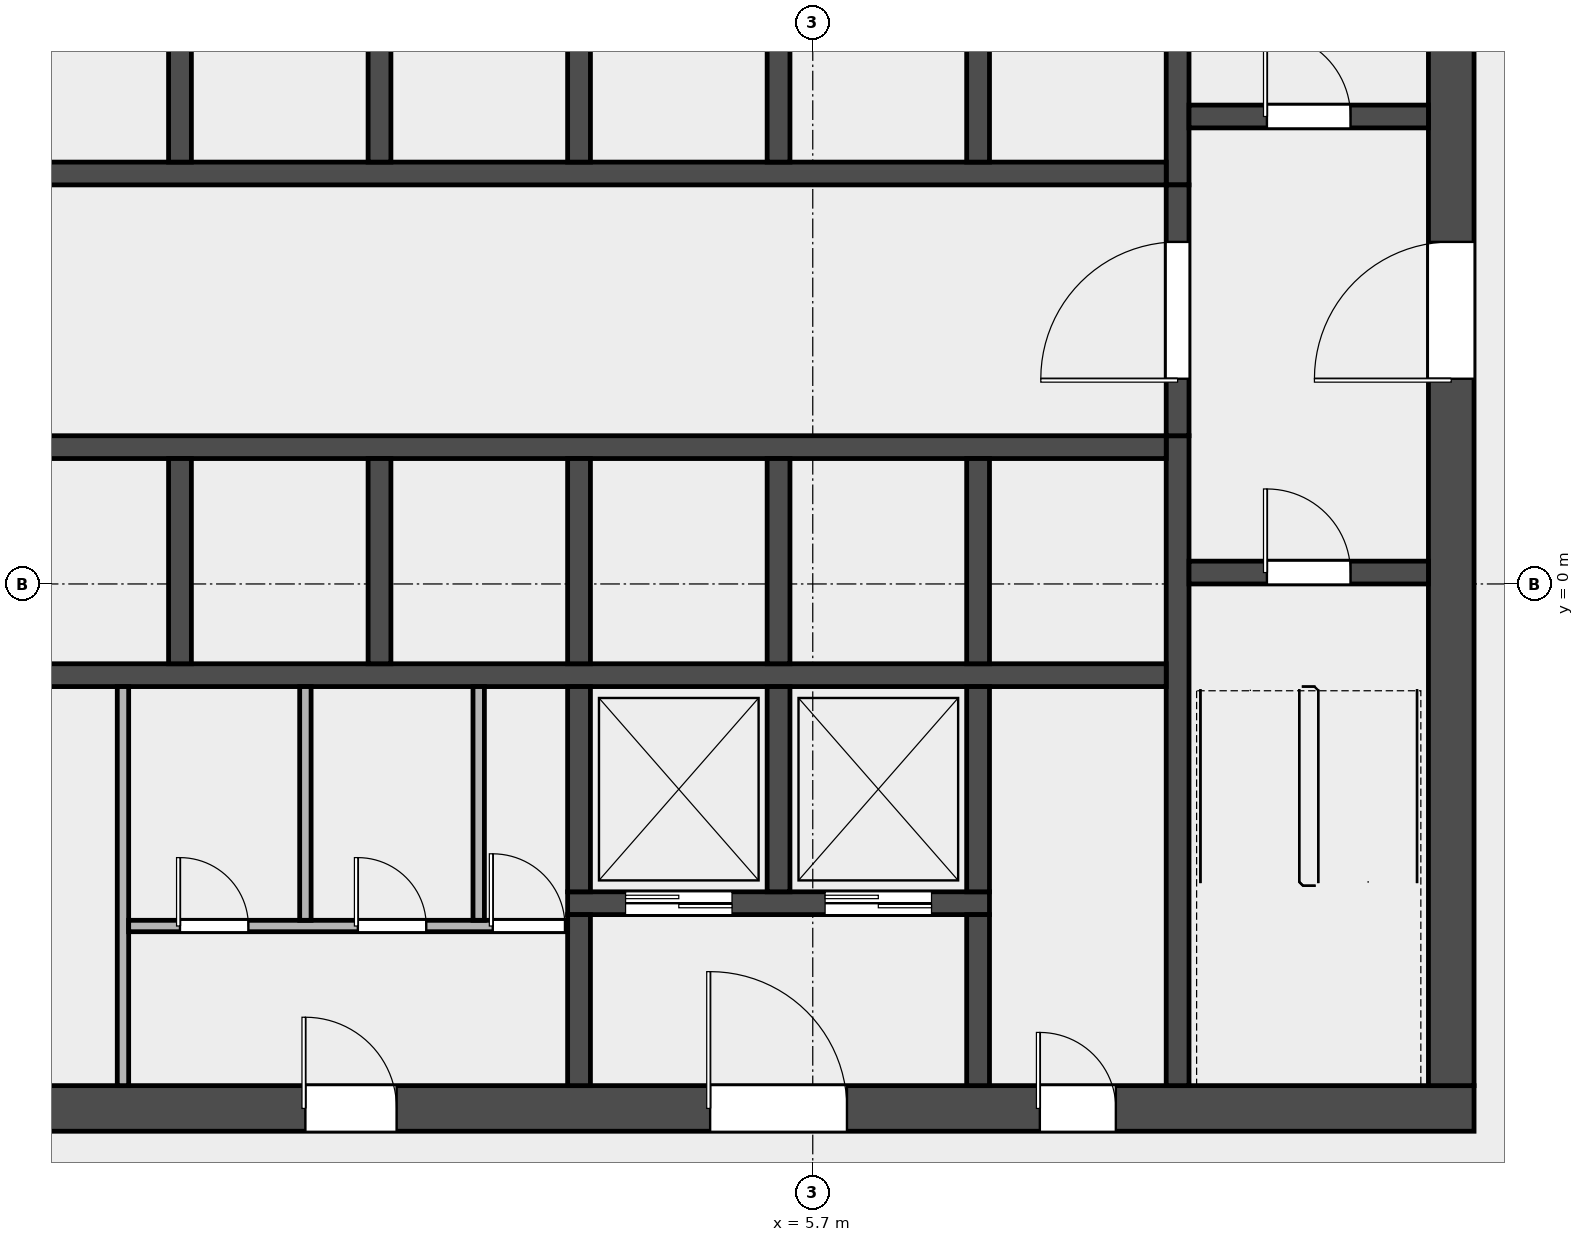
"""IFC4 building model, lengths in metres.
Left out: names, types, materials, properties, quantities, classifications, styles, units other than length and angle.
Written with IfcOpenShell. Run it as: python <this file> out.ifc"""

import sys

from ifc_helpers import new_model, si_unit, direction, frame, frame_2d, origin, place, context, subcontext, project, spatial, rectangle, extrude, element, fill, save


model = new_model("IFC4")
c1 = context("Model", 3, precision=1e-05, world=origin(), true_north=direction((0.0, 1.0)))
c2 = subcontext(c1, "Body", "Model", "MODEL_VIEW")
j1 = project(units=[si_unit("LENGTHUNIT", "METRE"), si_unit("PLANEANGLEUNIT", "RADIAN")], contexts=[c1])
p1 = place(None, origin())
s1 = spatial("IfcSite", under=j1, at=p1, CompositionType="ELEMENT")
p2 = place(p1, origin())
s2 = spatial("IfcBuilding", under=s1, at=p2, CompositionType="ELEMENT")
p3 = place(p2, frame((0.0, 0.0, 205.0)))
s3 = spatial("IfcBuildingStorey", under=s2, at=p3, CompositionType="ELEMENT", Elevation=205.0)
p4 = place(p3, frame((-14.4, -6.9, 0.0), z_axis=(0.0, 0.0, 1.0), x_axis=(1.0, 0.0, 0.0)))
e1 = element("IfcWall", 1, at=p4, inside=s3, PredefinedType="SHEAR", context=c2, shape_type="SweptSolid", body=[
    extrude(rectangle(XDim=28.8, YDim=0.6, at=frame_2d((14.4, 0.0))), origin(), (0.0, 0.0, 1.0), 5.7),
])
p5 = place(p4, frame((4.9, 0.0, 0.0)))
e2 = element("IfcOpeningElement", 2, at=p5, cuts=e1, PredefinedType="OPENING", context=c2, shape_type="SweptSolid", body=[
    extrude(rectangle(XDim=1.0, YDim=2.1, at=frame_2d((0.5, 1.05))), frame((0.0, 0.312, 0.0), z_axis=(0.0, -1.0, 0.0), x_axis=(1.0, 0.0, 0.0)), (0.0, 0.0, 1.0), 0.624),
])
p6 = place(p4, frame((8.462, 0.0, 0.0)))
e3 = element("IfcOpeningElement", 3, at=p6, cuts=e1, PredefinedType="OPENING", context=c2, shape_type="SweptSolid", body=[
    extrude(rectangle(XDim=1.0, YDim=2.1, at=frame_2d((0.5, 1.05))), frame((0.0, 0.312, 0.0), z_axis=(0.0, -1.0, 0.0), x_axis=(1.0, 0.0, 0.0)), (0.0, 0.0, 1.0), 0.624),
])
p7 = place(p4, frame((13.425, 0.0, 0.0)))
e4 = element("IfcOpeningElement", 4, at=p7, cuts=e1, PredefinedType="OPENING", context=c2, shape_type="SweptSolid", body=[
    extrude(rectangle(XDim=1.2, YDim=2.1, at=frame_2d((0.6, 1.05))), frame((0.0, 0.312, 0.0), z_axis=(0.0, -1.0, 0.0), x_axis=(1.0, 0.0, 0.0)), (0.0, 0.0, 1.0), 0.624),
])
p8 = place(p4, frame((18.75, 0.0, 0.0)))
e5 = element("IfcOpeningElement", 5, at=p8, cuts=e1, PredefinedType="OPENING", context=c2, shape_type="SweptSolid", body=[
    extrude(rectangle(XDim=1.8, YDim=2.1, at=frame_2d((0.9, 1.05))), frame((0.0, 0.312, 0.0), z_axis=(0.0, -1.0, 0.0), x_axis=(1.0, 0.0, 0.0)), (0.0, 0.0, 1.0), 0.624),
])
p9 = place(p4, frame((23.087, 0.0, 0.0)))
e6 = element("IfcOpeningElement", 6, at=p9, cuts=e1, PredefinedType="OPENING", context=c2, shape_type="SweptSolid", body=[
    extrude(rectangle(XDim=1.0, YDim=2.1, at=frame_2d((0.5, 1.05))), frame((0.0, 0.312, 0.0), z_axis=(0.0, -1.0, 0.0), x_axis=(1.0, 0.0, 0.0)), (0.0, 0.0, 1.0), 0.624),
])
p10 = place(p3, frame((14.1, -6.6, 0.0), z_axis=(0.0, 0.0, 1.0), x_axis=(0.0, 1.0, 0.0)))
e7 = element("IfcWall", 7, at=p10, inside=s3, PredefinedType="SHEAR", context=c2, shape_type="SweptSolid", body=[
    extrude(rectangle(XDim=19.5, YDim=0.6, at=frame_2d((9.75, 0.0))), origin(), (0.0, 0.0, 1.0), 5.7),
])
p11 = place(p10, frame((9.3, 0.0, 0.0)))
e8 = element("IfcOpeningElement", 8, at=p11, cuts=e7, PredefinedType="OPENING", context=c2, shape_type="SweptSolid", body=[
    extrude(rectangle(XDim=1.8, YDim=2.1, at=frame_2d((0.9, 1.05))), frame((0.0, 0.312, 0.0), z_axis=(0.0, -1.0, 0.0), x_axis=(1.0, 0.0, 0.0)), (0.0, 0.0, 1.0), 0.624),
])
p12 = place(p3, frame((10.5, -6.6, 0.0), z_axis=(0.0, 0.0, 1.0), x_axis=(0.0, 1.0, 0.0)))
e9 = element("IfcWall", 9, at=p12, inside=s3, PredefinedType="SHEAR", context=c2, shape_type="SweptSolid", body=[
    extrude(rectangle(XDim=8.55, YDim=0.3, at=frame_2d((4.275, 0.0))), origin(), (0.0, 0.0, 1.0), 5.7),
])
p13 = place(p3, frame((10.5, 5.25, 0.0), z_axis=(0.0, 0.0, 1.0), x_axis=(0.0, 1.0, 0.0)))
e10 = element("IfcWall", 10, at=p13, inside=s3, PredefinedType="SHEAR", context=c2, shape_type="SweptSolid", body=[
    extrude(rectangle(XDim=7.65, YDim=0.3, at=frame_2d((3.825, 0.0))), origin(), (0.0, 0.0, 1.0), 5.7),
])
p14 = place(p3, frame((10.65, 0.15, 0.0), z_axis=(0.0, 0.0, 1.0), x_axis=(1.0, 0.0, 0.0)))
e11 = element("IfcWall", 11, at=p14, inside=s3, PredefinedType="SOLIDWALL", context=c2, shape_type="SweptSolid", body=[
    extrude(rectangle(XDim=3.15, YDim=0.3, at=frame_2d((1.575, 0.0))), origin(), (0.0, 0.0, 1.0), 5.7),
])
p15 = place(p14, frame((1.025, 0.0, 0.0)))
e12 = element("IfcOpeningElement", 12, at=p15, cuts=e11, PredefinedType="OPENING", context=c2, shape_type="SweptSolid", body=[
    extrude(rectangle(XDim=1.1, YDim=2.1, at=frame_2d((0.55, 1.05))), frame((0.0, 0.162, 0.0), z_axis=(0.0, -1.0, 0.0), x_axis=(1.0, 0.0, 0.0)), (0.0, 0.0, 1.0), 0.324),
])
p16 = place(p3, frame((10.65, 6.15, 0.0), z_axis=(0.0, 0.0, 1.0), x_axis=(1.0, 0.0, 0.0)))
e13 = element("IfcWall", 13, at=p16, inside=s3, PredefinedType="SOLIDWALL", context=c2, shape_type="SweptSolid", body=[
    extrude(rectangle(XDim=3.15, YDim=0.3, at=frame_2d((1.575, 0.0))), origin(), (0.0, 0.0, 1.0), 5.7),
])
p17 = place(p16, frame((1.025, 0.0, 0.0)))
e14 = element("IfcOpeningElement", 14, at=p17, cuts=e13, PredefinedType="OPENING", context=c2, shape_type="SweptSolid", body=[
    extrude(rectangle(XDim=1.1, YDim=2.1, at=frame_2d((0.55, 1.05))), frame((0.0, 0.162, 0.0), z_axis=(0.0, -1.0, 0.0), x_axis=(1.0, 0.0, 0.0)), (0.0, 0.0, 1.0), 0.324),
])
p18 = place(p3, frame((-10.35, -1.2, 0.0), z_axis=(0.0, 0.0, 1.0), x_axis=(1.0, 0.0, 0.0)))
e15 = element("IfcWall", 15, at=p18, inside=s3, PredefinedType="SOLIDWALL", context=c2, shape_type="SweptSolid", body=[
    extrude(rectangle(XDim=20.7, YDim=0.3, at=frame_2d((10.35, 0.0))), origin(), (0.0, 0.0, 1.0), 5.7),
])
p19 = place(p3, frame((-10.35, 1.8, 0.0), z_axis=(0.0, 0.0, 1.0), x_axis=(1.0, 0.0, 0.0)))
e16 = element("IfcWall", 16, at=p19, inside=s3, PredefinedType="SOLIDWALL", context=c2, shape_type="SweptSolid", body=[
    extrude(rectangle(XDim=20.7, YDim=0.3, at=frame_2d((10.35, 0.0))), origin(), (0.0, 0.0, 1.0), 5.7),
])
p20 = place(p19, frame((0.512, 0.0, 0.0)))
e17 = element("IfcOpeningElement", 17, at=p20, cuts=e16, PredefinedType="OPENING", context=c2, shape_type="SweptSolid", body=[
    extrude(rectangle(XDim=1.3, YDim=2.1, at=frame_2d((0.65, 1.05))), frame((0.0, 0.162, 0.0), z_axis=(0.0, -1.0, 0.0), x_axis=(1.0, 0.0, 0.0)), (0.0, 0.0, 1.0), 0.324),
])
p21 = place(p3, frame((-10.35, 5.4, 0.0), z_axis=(0.0, 0.0, 1.0), x_axis=(1.0, 0.0, 0.0)))
e18 = element("IfcWall", 18, at=p21, inside=s3, PredefinedType="SOLIDWALL", context=c2, shape_type="SweptSolid", body=[
    extrude(rectangle(XDim=20.7, YDim=0.3, at=frame_2d((10.35, 0.0))), origin(), (0.0, 0.0, 1.0), 5.7),
])
p22 = place(p21, frame((0.512, 0.0, 0.0)))
e19 = element("IfcOpeningElement", 19, at=p22, cuts=e18, PredefinedType="OPENING", context=c2, shape_type="SweptSolid", body=[
    extrude(rectangle(XDim=1.3, YDim=2.1, at=frame_2d((0.65, 1.05))), frame((0.0, 0.162, 0.0), z_axis=(0.0, -1.0, 0.0), x_axis=(1.0, 0.0, 0.0)), (0.0, 0.0, 1.0), 0.324),
])
for number, where, z_axis, x_axis in (
    (20, (-2.625, -1.05, 0.0), (0.0, 0.0, 1.0), (0.0, 1.0, 0.0)),
    (21, (0.0, -1.05, 0.0), (0.0, 0.0, 1.0), (0.0, 1.0, 0.0)),
    (22, (2.625, -1.05, 0.0), (0.0, 0.0, 1.0), (0.0, 1.0, 0.0)),
    (23, (5.25, -1.05, 0.0), (0.0, 0.0, 1.0), (0.0, 1.0, 0.0)),
    (24, (7.875, -1.05, 0.0), (0.0, 0.0, 1.0), (0.0, 1.0, 0.0)),
    (25, (-2.625, 5.55, 0.0), (0.0, 0.0, 1.0), (0.0, 1.0, 0.0)),
    (26, (0.0, 5.55, 0.0), (0.0, 0.0, 1.0), (0.0, 1.0, 0.0)),
    (27, (2.625, 5.55, 0.0), (0.0, 0.0, 1.0), (0.0, 1.0, 0.0)),
    (28, (5.25, 5.55, 0.0), (0.0, 0.0, 1.0), (0.0, 1.0, 0.0)),
    (29, (7.875, 5.55, 0.0), (0.0, 0.0, 1.0), (0.0, 1.0, 0.0)),
):
    element("IfcWall", number, at=place(p3, frame(where, z_axis=z_axis, x_axis=x_axis)), inside=s3, PredefinedType="SOLIDWALL", context=c2, shape_type="SweptSolid", body=[
        extrude(rectangle(XDim=2.7, YDim=0.3, at=frame_2d((1.35, 0.0))), origin(), (0.0, 0.0, 1.0), 5.7),
    ])
p23 = place(p3, frame((2.475, -4.2, 0.0), z_axis=(0.0, 0.0, 1.0), x_axis=(1.0, 0.0, 0.0)))
e30 = element("IfcWall", 30, at=p23, inside=s3, PredefinedType="SOLIDWALL", context=c2, shape_type="SweptSolid", body=[
    extrude(rectangle(XDim=5.55, YDim=0.3, at=frame_2d((2.775, 0.0))), origin(), (0.0, 0.0, 1.0), 5.7),
])
p24 = place(p23, frame((0.762, 0.0, 0.0)))
e31 = element("IfcOpeningElement", 31, at=p24, cuts=e30, PredefinedType="OPENING", context=c2, shape_type="SweptSolid", body=[
    extrude(rectangle(XDim=1.4, YDim=2.1, at=frame_2d((0.7, 1.05))), frame((0.0, 0.162, 0.0), z_axis=(0.0, -1.0, 0.0), x_axis=(1.0, 0.0, 0.0)), (0.0, 0.0, 1.0), 0.324),
])
p25 = place(p23, frame((3.387, 0.0, 0.0)))
e32 = element("IfcOpeningElement", 32, at=p25, cuts=e30, PredefinedType="OPENING", context=c2, shape_type="SweptSolid", body=[
    extrude(rectangle(XDim=1.4, YDim=2.1, at=frame_2d((0.7, 1.05))), frame((0.0, 0.162, 0.0), z_axis=(0.0, -1.0, 0.0), x_axis=(1.0, 0.0, 0.0)), (0.0, 0.0, 1.0), 0.324),
])
p26 = place(p3, frame((2.625, -4.05, 0.0), z_axis=(0.0, 0.0, 1.0), x_axis=(0.0, 1.0, 0.0)))
e33 = element("IfcWall", 33, at=p26, inside=s3, PredefinedType="SOLIDWALL", context=c2, shape_type="SweptSolid", body=[
    extrude(rectangle(XDim=2.7, YDim=0.3, at=frame_2d((1.35, 0.0))), origin(), (0.0, 0.0, 1.0), 5.7),
])
p27 = place(p3, frame((2.625, -6.6, 0.0), z_axis=(0.0, 0.0, 1.0), x_axis=(0.0, 1.0, 0.0)))
e34 = element("IfcWall", 34, at=p27, inside=s3, PredefinedType="SOLIDWALL", context=c2, shape_type="SweptSolid", body=[
    extrude(rectangle(XDim=2.25, YDim=0.3, at=frame_2d((1.125, 0.0))), origin(), (0.0, 0.0, 1.0), 5.7),
])
for number, where, z_axis, x_axis in (
    (35, (5.25, -4.05, 0.0), (0.0, 0.0, 1.0), (0.0, 1.0, 0.0)),
    (36, (7.875, -4.05, 0.0), (0.0, 0.0, 1.0), (0.0, 1.0, 0.0)),
):
    element("IfcWall", number, at=place(p3, frame(where, z_axis=z_axis, x_axis=x_axis)), inside=s3, PredefinedType="SOLIDWALL", context=c2, shape_type="SweptSolid", body=[
        extrude(rectangle(XDim=2.7, YDim=0.3, at=frame_2d((1.35, 0.0))), origin(), (0.0, 0.0, 1.0), 5.7),
    ])
p28 = place(p3, frame((7.875, -6.6, 0.0), z_axis=(0.0, 0.0, 1.0), x_axis=(0.0, 1.0, 0.0)))
e37 = element("IfcWall", 37, at=p28, inside=s3, PredefinedType="SOLIDWALL", context=c2, shape_type="SweptSolid", body=[
    extrude(rectangle(XDim=2.25, YDim=0.3, at=frame_2d((1.125, 0.0))), origin(), (0.0, 0.0, 1.0), 5.7),
])
p29 = place(p3, frame((-3.375, -6.6, 0.0), z_axis=(0.0, 0.0, 1.0), x_axis=(0.0, 1.0, 0.0)))
e38 = element("IfcWall", 38, at=p29, inside=s3, PredefinedType="PARTITIONING", context=c2, shape_type="SweptSolid", body=[
    extrude(rectangle(XDim=5.25, YDim=0.15, at=frame_2d((2.625, 0.0))), origin(), (0.0, 0.0, 1.0), 5.7),
])
p30 = place(p3, frame((-3.3, -4.5, 0.0), z_axis=(0.0, 0.0, 1.0), x_axis=(1.0, 0.0, 0.0)))
e39 = element("IfcWall", 39, at=p30, inside=s3, PredefinedType="PARTITIONING", context=c2, shape_type="SweptSolid", body=[
    extrude(rectangle(XDim=5.775, YDim=0.15, at=frame_2d((2.888, 0.0))), origin(), (0.0, 0.0, 1.0), 5.7),
])
p31 = place(p30, frame((0.675, 0.0, 0.0)))
e40 = element("IfcOpeningElement", 40, at=p31, cuts=e39, PredefinedType="OPENING", context=c2, shape_type="SweptSolid", body=[
    extrude(rectangle(XDim=0.9, YDim=2.1, at=frame_2d((0.45, 1.05))), frame((0.0, 0.087, 0.0), z_axis=(0.0, -1.0, 0.0), x_axis=(1.0, 0.0, 0.0)), (0.0, 0.0, 1.0), 0.174),
])
p32 = place(p30, frame((3.015, 0.0, 0.0)))
e41 = element("IfcOpeningElement", 41, at=p32, cuts=e39, PredefinedType="OPENING", context=c2, shape_type="SweptSolid", body=[
    extrude(rectangle(XDim=0.9, YDim=2.1, at=frame_2d((0.45, 1.05))), frame((0.0, 0.087, 0.0), z_axis=(0.0, -1.0, 0.0), x_axis=(1.0, 0.0, 0.0)), (0.0, 0.0, 1.0), 0.174),
])
p33 = place(p30, frame((4.79, 0.0, 0.0)))
e42 = element("IfcOpeningElement", 42, at=p33, cuts=e39, PredefinedType="OPENING", context=c2, shape_type="SweptSolid", body=[
    extrude(rectangle(XDim=0.95, YDim=2.1, at=frame_2d((0.475, 1.05))), frame((0.0, 0.087, 0.0), z_axis=(0.0, -1.0, 0.0), x_axis=(1.0, 0.0, 0.0)), (0.0, 0.0, 1.0), 0.174),
])
for number, where, z_axis, x_axis in (
    (43, (-0.975, -4.425, 0.0), (0.0, 0.0, 1.0), (0.0, 1.0, 0.0)),
    (44, (1.305, -4.425, 0.0), (0.0, 0.0, 1.0), (0.0, 1.0, 0.0)),
):
    element("IfcWall", number, at=place(p3, frame(where, z_axis=z_axis, x_axis=x_axis)), inside=s3, PredefinedType="PARTITIONING", context=c2, shape_type="SweptSolid", body=[
        extrude(rectangle(XDim=3.075, YDim=0.15, at=frame_2d((1.538, 0.0))), origin(), (0.0, 0.0, 1.0), 5.7),
    ])
p34 = place(p3, frame((10.5, 1.95, 0.0), z_axis=(0.0, 0.0, 1.0), x_axis=(0.0, 1.0, 0.0)))
e45 = element("IfcWall", 45, at=p34, inside=s3, PredefinedType="SOLIDWALL", context=c2, shape_type="SweptSolid", body=[
    extrude(rectangle(XDim=3.3, YDim=0.3, at=frame_2d((1.65, 0.0))), origin(), (0.0, 0.0, 1.0), 5.7),
])
p35 = place(p34, frame((0.75, 0.0, 0.0)))
e46 = element("IfcOpeningElement", 46, at=p35, cuts=e45, PredefinedType="OPENING", context=c2, shape_type="SweptSolid", body=[
    extrude(rectangle(XDim=1.8, YDim=2.1, at=frame_2d((0.9, 1.05))), frame((0.0, 0.162, 0.0), z_axis=(0.0, -1.0, 0.0), x_axis=(1.0, 0.0, 0.0)), (0.0, 0.0, 1.0), 0.324),
])
p36 = place(p15, origin())
e47 = element("IfcDoor", 47, at=p36, inside=s3, OperationType="SINGLE_SWING_RIGHT", PredefinedType="DOOR", context=c2, shape_type="SweptSolid", body=[
    extrude(rectangle(XDim=1.1, YDim=2.1, at=frame_2d((0.55, 1.05))), frame((0.0, 0.025, 0.0), z_axis=(0.0, -1.0, 0.0), x_axis=(1.0, 0.0, 0.0)), (0.0, 0.0, 1.0), 0.05),
])
fill(e12, e47)
p37 = place(p17, origin())
e48 = element("IfcDoor", 48, at=p37, inside=s3, OperationType="SINGLE_SWING_RIGHT", PredefinedType="DOOR", context=c2, shape_type="SweptSolid", body=[
    extrude(rectangle(XDim=1.1, YDim=2.1, at=frame_2d((0.55, 1.05))), frame((0.0, 0.025, 0.0), z_axis=(0.0, -1.0, 0.0), x_axis=(1.0, 0.0, 0.0)), (0.0, 0.0, 1.0), 0.05),
])
fill(e14, e48)
p38 = place(p11, origin())
e49 = element("IfcDoor", 49, at=p38, inside=s3, OperationType="DOUBLE_DOOR_SINGLE_SWING", PredefinedType="DOOR", context=c2, shape_type="SweptSolid", body=[
    extrude(rectangle(XDim=1.8, YDim=2.1, at=frame_2d((0.9, 1.05))), frame((0.0, 0.025, 0.0), z_axis=(0.0, -1.0, 0.0), x_axis=(1.0, 0.0, 0.0)), (0.0, 0.0, 1.0), 0.05),
])
fill(e8, e49)
p39 = place(p35, origin())
e50 = element("IfcDoor", 50, at=p39, inside=s3, OperationType="DOUBLE_DOOR_SINGLE_SWING", PredefinedType="DOOR", context=c2, shape_type="SweptSolid", body=[
    extrude(rectangle(XDim=1.8, YDim=2.1, at=frame_2d((0.9, 1.05))), frame((0.0, 0.025, 0.0), z_axis=(0.0, -1.0, 0.0), x_axis=(1.0, 0.0, 0.0)), (0.0, 0.0, 1.0), 0.05),
])
fill(e46, e50)
p40 = place(p24, origin())
e51 = element("IfcDoor", 51, at=p40, inside=s3, OperationType="DOUBLE_DOOR_SLIDING", PredefinedType="DOOR", context=c2, shape_type="SweptSolid", body=[
    extrude(rectangle(XDim=1.4, YDim=2.1, at=frame_2d((0.7, 1.05))), frame((0.0, 0.025, 0.0), z_axis=(0.0, -1.0, 0.0), x_axis=(1.0, 0.0, 0.0)), (0.0, 0.0, 1.0), 0.05),
])
fill(e31, e51)
p41 = place(p25, origin())
e52 = element("IfcDoor", 52, at=p41, inside=s3, OperationType="DOUBLE_DOOR_SLIDING", PredefinedType="DOOR", context=c2, shape_type="SweptSolid", body=[
    extrude(rectangle(XDim=1.4, YDim=2.1, at=frame_2d((0.7, 1.05))), frame((0.0, 0.025, 0.0), z_axis=(0.0, -1.0, 0.0), x_axis=(1.0, 0.0, 0.0)), (0.0, 0.0, 1.0), 0.05),
])
fill(e32, e52)
p42 = place(p7, origin())
e53 = element("IfcDoor", 53, at=p42, inside=s3, OperationType="SINGLE_SWING_LEFT", PredefinedType="DOOR", context=c2, shape_type="SweptSolid", body=[
    extrude(rectangle(XDim=1.2, YDim=2.1, at=frame_2d((0.6, 1.05))), frame((0.0, 0.025, 0.0), z_axis=(0.0, -1.0, 0.0), x_axis=(1.0, 0.0, 0.0)), (0.0, 0.0, 1.0), 0.05),
])
fill(e4, e53)
p43 = place(p31, origin())
e54 = element("IfcDoor", 54, at=p43, inside=s3, OperationType="SINGLE_SWING_LEFT", PredefinedType="DOOR", context=c2, shape_type="SweptSolid", body=[
    extrude(rectangle(XDim=0.9, YDim=2.1, at=frame_2d((0.45, 1.05))), frame((0.0, 0.025, 0.0), z_axis=(0.0, -1.0, 0.0), x_axis=(1.0, 0.0, 0.0)), (0.0, 0.0, 1.0), 0.05),
])
fill(e40, e54)
p44 = place(p32, origin())
e55 = element("IfcDoor", 55, at=p44, inside=s3, OperationType="SINGLE_SWING_LEFT", PredefinedType="DOOR", context=c2, shape_type="SweptSolid", body=[
    extrude(rectangle(XDim=0.9, YDim=2.1, at=frame_2d((0.45, 1.05))), frame((0.0, 0.025, 0.0), z_axis=(0.0, -1.0, 0.0), x_axis=(1.0, 0.0, 0.0)), (0.0, 0.0, 1.0), 0.05),
])
fill(e41, e55)
p45 = place(p33, origin())
e56 = element("IfcDoor", 56, at=p45, inside=s3, OperationType="SINGLE_SWING_LEFT", PredefinedType="DOOR", context=c2, shape_type="SweptSolid", body=[
    extrude(rectangle(XDim=0.95, YDim=2.1, at=frame_2d((0.475, 1.05))), frame((0.0, 0.025, 0.0), z_axis=(0.0, -1.0, 0.0), x_axis=(1.0, 0.0, 0.0)), (0.0, 0.0, 1.0), 0.05),
])
fill(e42, e56)
p46 = place(p8, origin())
e57 = element("IfcDoor", 57, at=p46, inside=s3, OperationType="DOUBLE_DOOR_SINGLE_SWING", PredefinedType="DOOR", context=c2, shape_type="SweptSolid", body=[
    extrude(rectangle(XDim=1.8, YDim=2.1, at=frame_2d((0.9, 1.05))), frame((0.0, 0.025, 0.0), z_axis=(0.0, -1.0, 0.0), x_axis=(1.0, 0.0, 0.0)), (0.0, 0.0, 1.0), 0.05),
])
fill(e5, e57)
p47 = place(p9, origin())
e58 = element("IfcDoor", 58, at=p47, inside=s3, OperationType="SINGLE_SWING_LEFT", PredefinedType="DOOR", context=c2, shape_type="SweptSolid", body=[
    extrude(rectangle(XDim=1.0, YDim=2.1, at=frame_2d((0.5, 1.05))), frame((0.0, 0.025, 0.0), z_axis=(0.0, -1.0, 0.0), x_axis=(1.0, 0.0, 0.0)), (0.0, 0.0, 1.0), 0.05),
])
fill(e6, e58)
save(model, sys.argv[1])
